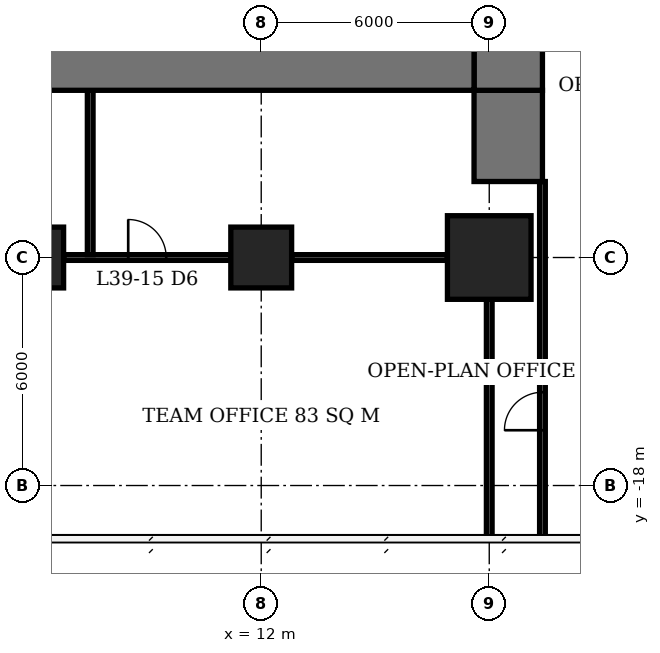
"""IFC4 building model, lengths in metres.
Left out: names, types, materials, properties, quantities, classifications, styles, units other than length and angle.
Written with IfcOpenShell. Run it as: python <this file> out.ifc"""

import sys

from ifc_helpers import new_model, si_unit, direction, frame, frame_2d, origin, origin_2d, place, context, subcontext, project, spatial, rectangle, extrude, element, fill, save


model = new_model("IFC4")
c1 = context("Model", 3, precision=1e-05, world=origin(), true_north=direction((0.0, 1.0)))
c2 = subcontext(c1, "Body", "Model", "MODEL_VIEW")
j1 = project(units=[si_unit("LENGTHUNIT", "METRE"), si_unit("PLANEANGLEUNIT", "RADIAN")], contexts=[c1])
p1 = place(None, origin())
s1 = spatial("IfcSite", under=j1, at=p1, CompositionType="ELEMENT")
p2 = place(p1, origin())
s2 = spatial("IfcBuilding", under=s1, at=p2, CompositionType="ELEMENT")
p3 = place(p2, frame((0.0, 0.0, 160.1)))
s3 = spatial("IfcBuildingStorey", under=s2, at=p3, CompositionType="ELEMENT", Elevation=160.1)
for number, where, z_axis, x_axis in (
    (1, (6.0, -12.0, 0.0), (0.0, 0.0, 1.0), (1.0, 0.0, 0.0)),
    (2, (12.0, -12.0, 0.0), (0.0, 0.0, 1.0), (1.0, 0.0, 0.0)),
):
    element("IfcColumn", number, at=place(p3, frame(where, z_axis=z_axis, x_axis=x_axis)), inside=s3, PredefinedType="COLUMN", context=c2, shape_type="SweptSolid", body=[
        extrude(rectangle(XDim=1.6, YDim=1.6, at=origin_2d()), origin(), (0.0, 0.0, 1.0), 3.9),
    ])
p4 = place(p3, frame((18.0, -12.0, 0.0), z_axis=(0.0, 0.0, 1.0), x_axis=(1.0, 0.0, 0.0)))
e3 = element("IfcColumn", 3, at=p4, inside=s3, PredefinedType="COLUMN", context=c2, shape_type="SweptSolid", body=[
    extrude(rectangle(XDim=2.2, YDim=2.2, at=origin_2d()), origin(), (0.0, 0.0, 1.0), 3.9),
])
p5 = place(p3, frame((-5.6, -6.6, 0.0), z_axis=(0.0, 0.0, 1.0), x_axis=(1.0, 0.0, 0.0)))
e4 = element("IfcWall", 4, at=p5, inside=s3, PredefinedType="SHEAR", context=c2, shape_type="SweptSolid", body=[
    extrude(rectangle(XDim=23.2, YDim=2.0, at=frame_2d((11.6, 0.0))), origin(), (0.0, 0.0, 1.0), 3.9),
])
p6 = place(p3, frame((18.5, -7.6, 0.0), z_axis=(0.0, 0.0, 1.0), x_axis=(0.0, 1.0, 0.0)))
e5 = element("IfcWall", 5, at=p6, inside=s3, PredefinedType="SHEAR", context=c2, shape_type="SweptSolid", body=[
    extrude(rectangle(XDim=21.2, YDim=1.8, at=frame_2d((10.6, 0.0))), origin(), (0.0, 0.0, 1.0), 3.9),
])
p7 = place(p6, frame((9.2, 0.0, 0.0)))
e6 = element("IfcOpeningElement", 6, at=p7, cuts=e5, PredefinedType="OPENING", context=c2, shape_type="SweptSolid", body=[
    extrude(rectangle(XDim=1.8, YDim=2.4, at=frame_2d((0.9, 1.2))), frame((0.0, 0.91, 0.0), z_axis=(0.0, -1.0, 0.0), x_axis=(1.0, 0.0, 0.0)), (0.0, 0.0, 1.0), 1.82),
])
p8 = place(p3, frame((18.5, -10.0, 0.0), z_axis=(0.0, 0.0, 1.0), x_axis=(0.0, 1.0, 0.0)))
e7 = element("IfcWall", 7, at=p8, inside=s3, PredefinedType="SHEAR", context=c2, shape_type="SweptSolid", body=[
    extrude(rectangle(XDim=2.4, YDim=1.8, at=frame_2d((1.2, 0.0))), origin(), (0.0, 0.0, 1.0), 3.9),
])
p9 = place(p3, frame((6.8, -12.0, 0.0), z_axis=(0.0, 0.0, 1.0), x_axis=(1.0, 0.0, 0.0)))
e8 = element("IfcWall", 8, at=p9, inside=s3, PredefinedType="PARTITIONING", context=c2, shape_type="SweptSolid", body=[
    extrude(rectangle(XDim=4.4, YDim=0.15, at=frame_2d((2.2, 0.0))), origin(), (0.0, 0.0, 1.0), 3.65),
])
p10 = place(p9, frame((1.7, 0.0, 0.0)))
e9 = element("IfcOpeningElement", 9, at=p10, cuts=e8, PredefinedType="OPENING", context=c2, shape_type="SweptSolid", body=[
    extrude(rectangle(XDim=1.0, YDim=2.1, at=frame_2d((0.5, 1.05))), frame((0.0, 0.085, 0.0), z_axis=(0.0, -1.0, 0.0), x_axis=(1.0, 0.0, 0.0)), (0.0, 0.0, 1.0), 0.17),
])
p11 = place(p3, frame((12.8, -12.0, 0.0), z_axis=(0.0, 0.0, 1.0), x_axis=(1.0, 0.0, 0.0)))
e10 = element("IfcWall", 10, at=p11, inside=s3, PredefinedType="PARTITIONING", context=c2, shape_type="SweptSolid", body=[
    extrude(rectangle(XDim=4.1, YDim=0.15, at=frame_2d((2.05, 0.0))), origin(), (0.0, 0.0, 1.0), 3.65),
])
p12 = place(p3, frame((18.0, -19.4, 0.0), z_axis=(0.0, 0.0, 1.0), x_axis=(0.0, 1.0, 0.0)))
e11 = element("IfcWall", 11, at=p12, inside=s3, PredefinedType="PARTITIONING", context=c2, shape_type="SweptSolid", body=[
    extrude(rectangle(XDim=6.3, YDim=0.15, at=frame_2d((3.15, 0.0))), origin(), (0.0, 0.0, 1.0), 3.65),
])
p13 = place(p3, frame((7.5, -11.925, 0.0), z_axis=(0.0, 0.0, 1.0), x_axis=(0.0, 1.0, 0.0)))
e12 = element("IfcWall", 12, at=p13, inside=s3, PredefinedType="PARTITIONING", context=c2, shape_type="SweptSolid", body=[
    extrude(rectangle(XDim=4.325, YDim=0.15, at=frame_2d((2.163, 0.0))), origin(), (0.0, 0.0, 1.0), 3.65),
])
p14 = place(p3, frame((19.4, -19.4, 0.0), z_axis=(0.0, 0.0, 1.0), x_axis=(0.0, 1.0, 0.0)))
e13 = element("IfcWall", 13, at=p14, inside=s3, PredefinedType="PARTITIONING", context=c2, shape_type="SweptSolid", body=[
    extrude(rectangle(XDim=9.4, YDim=0.15, at=frame_2d((4.7, 0.0))), origin(), (0.0, 0.0, 1.0), 3.65),
])
p15 = place(p14, frame((2.855, 0.0, 0.0)))
e14 = element("IfcOpeningElement", 14, at=p15, cuts=e13, PredefinedType="OPENING", context=c2, shape_type="SweptSolid", body=[
    extrude(rectangle(XDim=1.0, YDim=2.1, at=frame_2d((0.5, 1.05))), frame((0.0, 0.085, 0.0), z_axis=(0.0, -1.0, 0.0), x_axis=(1.0, 0.0, 0.0)), (0.0, 0.0, 1.0), 0.17),
])
p16 = place(p10, origin())
e15 = element("IfcDoor", 15, at=p16, inside=s3, OperationType="SINGLE_SWING_LEFT", PredefinedType="DOOR", context=c2, shape_type="SweptSolid", body=[
    extrude(rectangle(XDim=1.0, YDim=2.1, at=frame_2d((0.5, 1.05))), frame((0.0, 0.025, 0.0), z_axis=(0.0, -1.0, 0.0), x_axis=(1.0, 0.0, 0.0)), (0.0, 0.0, 1.0), 0.05),
])
fill(e9, e15)
p17 = place(p15, origin())
e16 = element("IfcDoor", 16, at=p17, inside=s3, OperationType="SINGLE_SWING_LEFT", PredefinedType="DOOR", context=c2, shape_type="SweptSolid", body=[
    extrude(rectangle(XDim=1.0, YDim=2.1, at=frame_2d((0.5, 1.05))), frame((0.0, 0.025, 0.0), z_axis=(0.0, -1.0, 0.0), x_axis=(1.0, 0.0, 0.0)), (0.0, 0.0, 1.0), 0.05),
])
fill(e14, e16)
save(model, sys.argv[1])
